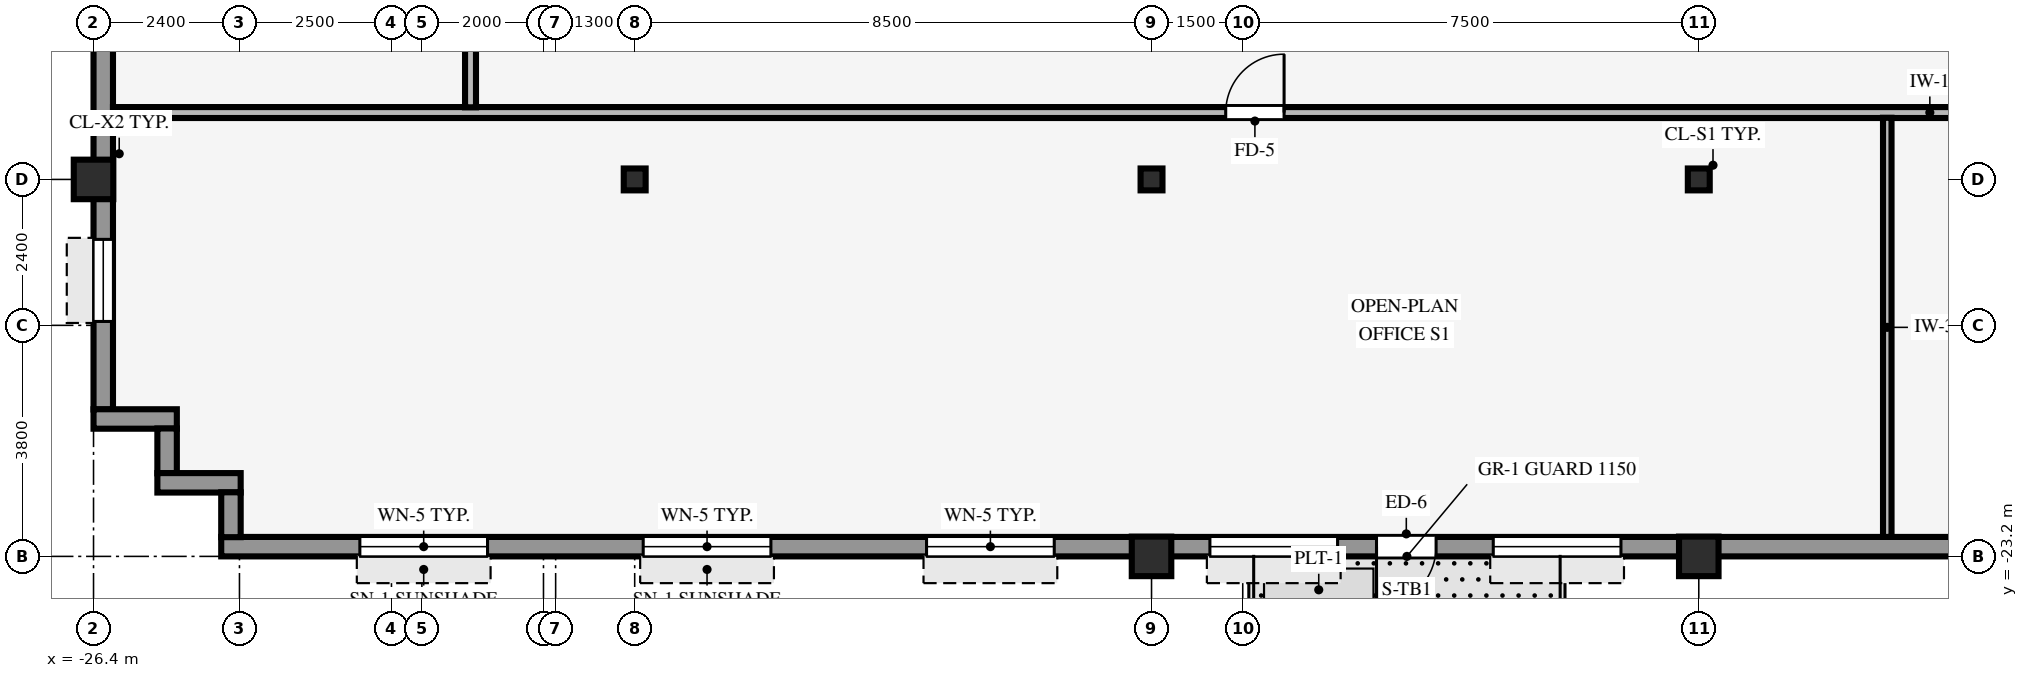
"""IFC4 building model, lengths in metres.
Left out: names, types, materials, properties, quantities, classifications, styles, units other than length and angle.
Written with IfcOpenShell. Run it as: python <this file> out.ifc"""

import sys

from ifc_helpers import new_model, si_unit, direction, frame, frame_2d, origin, origin_2d, place, context, subcontext, project, spatial, rectangle, hollow_rectangle, i_section, extrude, source, transform, mapped, element, fill, save


model = new_model("IFC4")
c1 = context("Model", 3, precision=1e-05, world=origin(), true_north=direction((0.0, 1.0)))
c2 = subcontext(c1, "Body", "Model", "MODEL_VIEW")
j1 = project(units=[si_unit("LENGTHUNIT", "METRE"), si_unit("PLANEANGLEUNIT", "RADIAN")], contexts=[c1])
p1 = place(None, origin())
s1 = spatial("IfcSite", under=j1, at=p1, CompositionType="ELEMENT")
p2 = place(p1, origin())
s2 = spatial("IfcBuilding", under=s1, at=p2, CompositionType="ELEMENT")
p3 = place(p2, frame((0.0, 0.0, 142.1)))
s3 = spatial("IfcBuildingStorey", under=s2, at=p3, CompositionType="ELEMENT", Elevation=142.1)
for number, where, z_axis, x_axis in (
    (1, (-26.4, -17.0, 0.0), (0.0, 0.0, 1.0), (1.0, 0.0, 0.0)),
    (2, (-9.0, -23.2, 0.0), (0.0, 0.0, 1.0), (1.0, 0.0, 0.0)),
    (3, (0.0, -23.2, 0.0), (0.0, 0.0, 1.0), (1.0, 0.0, 0.0)),
):
    element("IfcColumn", number, at=place(p3, frame(where, z_axis=z_axis, x_axis=x_axis)), inside=s3, PredefinedType="COLUMN", context=c2, shape_type="SweptSolid", body=[
        extrude(hollow_rectangle(XDim=0.65, YDim=0.65, WallThickness=0.04, InnerFilletRadius=0.04, OuterFilletRadius=0.08, at=origin_2d()), origin(), (0.0, 0.0, 1.0), 3.37),
    ])
for number, where, z_axis, x_axis in (
    (4, (0.0, -17.0, 0.0), (0.0, 0.0, 1.0), (1.0, 0.0, 0.0)),
    (5, (-17.5, -17.0, 0.0), (0.0, 0.0, 1.0), (1.0, 0.0, 0.0)),
    (6, (-9.0, -17.0, 0.0), (0.0, 0.0, 1.0), (1.0, 0.0, 0.0)),
):
    element("IfcColumn", number, at=place(p3, frame(where, z_axis=z_axis, x_axis=x_axis)), inside=s3, PredefinedType="COLUMN", context=c2, shape_type="SweptSolid", body=[
        extrude(i_section(OverallWidth=0.36, OverallDepth=0.36, WebThickness=0.021, FlangeThickness=0.021, FilletRadius=0.018, at=origin_2d()), origin(), (0.0, 0.0, 1.0), 3.37),
    ])
p4 = place(p3, frame((-24.3, -23.04, 0.0), z_axis=(0.0, 0.0, 1.0), x_axis=(1.0, 0.0, 0.0)))
e7 = element("IfcWall", 7, at=p4, inside=s3, PredefinedType="STANDARD", context=c2, shape_type="SweptSolid", body=[
    extrude(rectangle(XDim=48.6, YDim=0.32, at=frame_2d((24.3, 0.0))), origin(), (0.0, 0.0, 1.0), 2.705),
])
p5 = place(p4, frame((19.98, 0.0, 0.0), z_axis=(0.0, 0.0, 1.0), x_axis=(-1.0, 0.0, 0.0)))
e8 = element("IfcOpeningElement", 8, at=p5, cuts=e7, PredefinedType="OPENING", context=c2, shape_type="SweptSolid", body=[
    extrude(rectangle(XDim=0.98, YDim=2.15, at=frame_2d((0.49, 1.075))), frame((0.0, 0.17, 0.0), z_axis=(0.0, -1.0, 0.0), x_axis=(1.0, 0.0, 0.0)), (0.0, 0.0, 1.0), 0.34),
])
p6 = place(p4, frame((2.28, 0.0, 0.8)))
e9 = element("IfcOpeningElement", 9, at=p6, cuts=e7, PredefinedType="OPENING", context=c2, shape_type="SweptSolid", body=[
    extrude(rectangle(XDim=2.1, YDim=1.56, at=frame_2d((1.05, 0.78))), frame((0.0, 0.17, 0.0), z_axis=(0.0, -1.0, 0.0), x_axis=(1.0, 0.0, 0.0)), (0.0, 0.0, 1.0), 0.34),
])
p7 = place(p4, frame((6.94, 0.0, 0.8)))
e10 = element("IfcOpeningElement", 10, at=p7, cuts=e7, PredefinedType="OPENING", context=c2, shape_type="SweptSolid", body=[
    extrude(rectangle(XDim=2.1, YDim=1.56, at=frame_2d((1.05, 0.78))), frame((0.0, 0.17, 0.0), z_axis=(0.0, -1.0, 0.0), x_axis=(1.0, 0.0, 0.0)), (0.0, 0.0, 1.0), 0.34),
])
p8 = place(p4, frame((11.6, 0.0, 0.8)))
e11 = element("IfcOpeningElement", 11, at=p8, cuts=e7, PredefinedType="OPENING", context=c2, shape_type="SweptSolid", body=[
    extrude(rectangle(XDim=2.1, YDim=1.56, at=frame_2d((1.05, 0.78))), frame((0.0, 0.17, 0.0), z_axis=(0.0, -1.0, 0.0), x_axis=(1.0, 0.0, 0.0)), (0.0, 0.0, 1.0), 0.34),
])
p9 = place(p4, frame((16.26, 0.0, 0.8)))
e12 = element("IfcOpeningElement", 12, at=p9, cuts=e7, PredefinedType="OPENING", context=c2, shape_type="SweptSolid", body=[
    extrude(rectangle(XDim=2.1, YDim=1.56, at=frame_2d((1.05, 0.78))), frame((0.0, 0.17, 0.0), z_axis=(0.0, -1.0, 0.0), x_axis=(1.0, 0.0, 0.0)), (0.0, 0.0, 1.0), 0.34),
])
p10 = place(p4, frame((20.92, 0.0, 0.8)))
e13 = element("IfcOpeningElement", 13, at=p10, cuts=e7, PredefinedType="OPENING", context=c2, shape_type="SweptSolid", body=[
    extrude(rectangle(XDim=2.1, YDim=1.56, at=frame_2d((1.05, 0.78))), frame((0.0, 0.17, 0.0), z_axis=(0.0, -1.0, 0.0), x_axis=(1.0, 0.0, 0.0)), (0.0, 0.0, 1.0), 0.34),
])
p11 = place(p4, frame((30.24, 0.0, 0.8)))
e14 = element("IfcOpeningElement", 14, at=p11, cuts=e7, PredefinedType="OPENING", context=c2, shape_type="SweptSolid", body=[
    extrude(rectangle(XDim=2.1, YDim=1.56, at=frame_2d((1.05, 0.78))), frame((0.0, 0.17, 0.0), z_axis=(0.0, -1.0, 0.0), x_axis=(1.0, 0.0, 0.0)), (0.0, 0.0, 1.0), 0.34),
])
p12 = place(p4, frame((34.9, 0.0, 0.8)))
e15 = element("IfcOpeningElement", 15, at=p12, cuts=e7, PredefinedType="OPENING", context=c2, shape_type="SweptSolid", body=[
    extrude(rectangle(XDim=2.1, YDim=1.56, at=frame_2d((1.05, 0.78))), frame((0.0, 0.17, 0.0), z_axis=(0.0, -1.0, 0.0), x_axis=(1.0, 0.0, 0.0)), (0.0, 0.0, 1.0), 0.34),
])
p13 = place(p4, frame((39.56, 0.0, 0.8)))
e16 = element("IfcOpeningElement", 16, at=p13, cuts=e7, PredefinedType="OPENING", context=c2, shape_type="SweptSolid", body=[
    extrude(rectangle(XDim=2.1, YDim=1.56, at=frame_2d((1.05, 0.78))), frame((0.0, 0.17, 0.0), z_axis=(0.0, -1.0, 0.0), x_axis=(1.0, 0.0, 0.0)), (0.0, 0.0, 1.0), 0.34),
])
p14 = place(p4, frame((44.22, 0.0, 0.8)))
e17 = element("IfcOpeningElement", 17, at=p14, cuts=e7, PredefinedType="OPENING", context=c2, shape_type="SweptSolid", body=[
    extrude(rectangle(XDim=2.1, YDim=1.56, at=frame_2d((1.05, 0.78))), frame((0.0, 0.17, 0.0), z_axis=(0.0, -1.0, 0.0), x_axis=(1.0, 0.0, 0.0)), (0.0, 0.0, 1.0), 0.34),
])
p15 = place(p3, frame((-26.24, -20.784, 0.0), z_axis=(0.0, 0.0, 1.0), x_axis=(0.0, 1.0, 0.0)))
e18 = element("IfcWall", 18, at=p15, inside=s3, PredefinedType="STANDARD", context=c2, shape_type="SweptSolid", body=[
    extrude(rectangle(XDim=41.568, YDim=0.32, at=frame_2d((20.784, 0.0))), origin(), (0.0, 0.0, 1.0), 2.705),
])
p16 = place(p15, frame((1.448, 0.0, 0.8)))
e19 = element("IfcOpeningElement", 19, at=p16, cuts=e18, PredefinedType="OPENING", context=c2, shape_type="SweptSolid", body=[
    extrude(rectangle(XDim=1.35, YDim=1.56, at=frame_2d((0.675, 0.78))), frame((0.0, 0.17, 0.0), z_axis=(0.0, -1.0, 0.0), x_axis=(1.0, 0.0, 0.0)), (0.0, 0.0, 1.0), 0.34),
])
p17 = place(p15, frame((7.744, 0.0, 0.8)))
e20 = element("IfcOpeningElement", 20, at=p17, cuts=e18, PredefinedType="OPENING", context=c2, shape_type="SweptSolid", body=[
    extrude(rectangle(XDim=1.35, YDim=1.56, at=frame_2d((0.675, 0.78))), frame((0.0, 0.17, 0.0), z_axis=(0.0, -1.0, 0.0), x_axis=(1.0, 0.0, 0.0)), (0.0, 0.0, 1.0), 0.34),
])
p18 = place(p15, frame((12.69, 0.0, 0.8)))
e21 = element("IfcOpeningElement", 21, at=p18, cuts=e18, PredefinedType="OPENING", context=c2, shape_type="SweptSolid", body=[
    extrude(rectangle(XDim=1.35, YDim=1.56, at=frame_2d((0.675, 0.78))), frame((0.0, 0.17, 0.0), z_axis=(0.0, -1.0, 0.0), x_axis=(1.0, 0.0, 0.0)), (0.0, 0.0, 1.0), 0.34),
])
p19 = place(p15, frame((17.636, 0.0, 0.8)))
e22 = element("IfcOpeningElement", 22, at=p19, cuts=e18, PredefinedType="OPENING", context=c2, shape_type="SweptSolid", body=[
    extrude(rectangle(XDim=1.35, YDim=1.56, at=frame_2d((0.675, 0.78))), frame((0.0, 0.17, 0.0), z_axis=(0.0, -1.0, 0.0), x_axis=(1.0, 0.0, 0.0)), (0.0, 0.0, 1.0), 0.34),
])
p20 = place(p15, frame((22.582, 0.0, 0.8)))
e23 = element("IfcOpeningElement", 23, at=p20, cuts=e18, PredefinedType="OPENING", context=c2, shape_type="SweptSolid", body=[
    extrude(rectangle(XDim=1.35, YDim=1.56, at=frame_2d((0.675, 0.78))), frame((0.0, 0.17, 0.0), z_axis=(0.0, -1.0, 0.0), x_axis=(1.0, 0.0, 0.0)), (0.0, 0.0, 1.0), 0.34),
])
p21 = place(p15, frame((27.528, 0.0, 0.8)))
e24 = element("IfcOpeningElement", 24, at=p21, cuts=e18, PredefinedType="OPENING", context=c2, shape_type="SweptSolid", body=[
    extrude(rectangle(XDim=1.35, YDim=1.56, at=frame_2d((0.675, 0.78))), frame((0.0, 0.17, 0.0), z_axis=(0.0, -1.0, 0.0), x_axis=(1.0, 0.0, 0.0)), (0.0, 0.0, 1.0), 0.34),
])
p22 = place(p15, frame((32.474, 0.0, 0.8)))
e25 = element("IfcOpeningElement", 25, at=p22, cuts=e18, PredefinedType="OPENING", context=c2, shape_type="SweptSolid", body=[
    extrude(rectangle(XDim=1.35, YDim=1.56, at=frame_2d((0.675, 0.78))), frame((0.0, 0.17, 0.0), z_axis=(0.0, -1.0, 0.0), x_axis=(1.0, 0.0, 0.0)), (0.0, 0.0, 1.0), 0.34),
])
p23 = place(p15, frame((38.77, 0.0, 0.8)))
e26 = element("IfcOpeningElement", 26, at=p23, cuts=e18, PredefinedType="OPENING", context=c2, shape_type="SweptSolid", body=[
    extrude(rectangle(XDim=1.35, YDim=1.56, at=frame_2d((0.675, 0.78))), frame((0.0, 0.17, 0.0), z_axis=(0.0, -1.0, 0.0), x_axis=(1.0, 0.0, 0.0)), (0.0, 0.0, 1.0), 0.34),
])
p24 = place(p3, frame((-26.4, -20.94, 0.0), z_axis=(0.0, 0.0, 1.0), x_axis=(1.0, 0.0, 0.0)))
e27 = element("IfcWall", 27, at=p24, inside=s3, PredefinedType="STANDARD", context=c2, shape_type="SweptSolid", body=[
    extrude(rectangle(XDim=1.37, YDim=0.32, at=frame_2d((0.685, 0.0))), origin(), (0.0, 0.0, 1.0), 3.36),
])
p25 = place(p3, frame((-25.19, -21.834, 0.0), z_axis=(0.0, 0.0, 1.0), x_axis=(0.0, 1.0, 0.0)))
e28 = element("IfcWall", 28, at=p25, inside=s3, PredefinedType="STANDARD", context=c2, shape_type="SweptSolid", body=[
    extrude(rectangle(XDim=0.738, YDim=0.32, at=frame_2d((0.369, 0.0))), origin(), (0.0, 0.0, 1.0), 3.36),
])
p26 = place(p3, frame((-25.35, -21.99, 0.0), z_axis=(0.0, 0.0, 1.0), x_axis=(1.0, 0.0, 0.0)))
e29 = element("IfcWall", 29, at=p26, inside=s3, PredefinedType="STANDARD", context=c2, shape_type="SweptSolid", body=[
    extrude(rectangle(XDim=1.37, YDim=0.32, at=frame_2d((0.685, 0.0))), origin(), (0.0, 0.0, 1.0), 3.36),
])
p27 = place(p3, frame((-24.14, -22.884, 0.0), z_axis=(0.0, 0.0, 1.0), x_axis=(0.0, 1.0, 0.0)))
e30 = element("IfcWall", 30, at=p27, inside=s3, PredefinedType="STANDARD", context=c2, shape_type="SweptSolid", body=[
    extrude(rectangle(XDim=0.738, YDim=0.32, at=frame_2d((0.369, 0.0))), origin(), (0.0, 0.0, 1.0), 3.36),
])
p28 = place(p3, frame((-26.08, -15.9, 0.0), z_axis=(0.0, 0.0, 1.0), x_axis=(1.0, 0.0, 0.0)))
e31 = element("IfcWall", 31, at=p28, inside=s3, PredefinedType="PARTITIONING", context=c2, shape_type="SweptSolid", body=[
    extrude(rectangle(XDim=52.16, YDim=0.18, at=frame_2d((26.08, 0.0))), origin(), (0.0, 0.0, 1.0), 3.36),
])
p29 = place(p28, frame((18.3, 0.0, 0.0)))
e32 = element("IfcOpeningElement", 32, at=p29, cuts=e31, PredefinedType="OPENING", context=c2, shape_type="SweptSolid", body=[
    extrude(rectangle(XDim=0.96, YDim=2.1, at=frame_2d((0.48, 1.05))), frame((0.0, 0.1, 0.0), z_axis=(0.0, -1.0, 0.0), x_axis=(1.0, 0.0, 0.0)), (0.0, 0.0, 1.0), 0.2),
])
p30 = place(p28, frame((40.5, 0.0, 0.0)))
e33 = element("IfcOpeningElement", 33, at=p30, cuts=e31, PredefinedType="OPENING", context=c2, shape_type="SweptSolid", body=[
    extrude(rectangle(XDim=0.96, YDim=2.1, at=frame_2d((0.48, 1.05))), frame((0.0, 0.1, 0.0), z_axis=(0.0, -1.0, 0.0), x_axis=(1.0, 0.0, 0.0)), (0.0, 0.0, 1.0), 0.2),
])
p31 = place(p3, frame((-20.2, -15.814, 0.0), z_axis=(0.0, 0.0, 1.0), x_axis=(0.0, 1.0, 0.0)))
e34 = element("IfcWall", 34, at=p31, inside=s3, PredefinedType="PARTITIONING", context=c2, shape_type="SweptSolid", body=[
    extrude(rectangle(XDim=31.628, YDim=0.18, at=frame_2d((15.814, 0.0))), origin(), (0.0, 0.0, 1.0), 3.36),
])
p32 = place(p31, frame((10.684, 0.0, 0.0)))
e35 = element("IfcOpeningElement", 35, at=p32, cuts=e34, PredefinedType="OPENING", context=c2, shape_type="SweptSolid", body=[
    extrude(rectangle(XDim=0.96, YDim=2.1, at=frame_2d((0.48, 1.05))), frame((0.0, 0.1, 0.0), z_axis=(0.0, -1.0, 0.0), x_axis=(1.0, 0.0, 0.0)), (0.0, 0.0, 1.0), 0.2),
])
p33 = place(p31, frame((24.184, 0.0, 0.0)))
e36 = element("IfcOpeningElement", 36, at=p33, cuts=e34, PredefinedType="OPENING", context=c2, shape_type="SweptSolid", body=[
    extrude(rectangle(XDim=0.96, YDim=2.1, at=frame_2d((0.48, 1.05))), frame((0.0, 0.1, 0.0), z_axis=(0.0, -1.0, 0.0), x_axis=(1.0, 0.0, 0.0)), (0.0, 0.0, 1.0), 0.2),
])
p34 = place(p3, frame((3.1, -22.88, 0.0), z_axis=(0.0, 0.0, 1.0), x_axis=(0.0, 1.0, 0.0)))
e37 = element("IfcWall", 37, at=p34, inside=s3, PredefinedType="PARTITIONING", context=c2, shape_type="SweptSolid", body=[
    extrude(rectangle(XDim=6.894, YDim=0.14, at=frame_2d((3.447, 0.0))), origin(), (0.0, 0.0, 1.0), 3.36),
])
m1 = source(origin(), c2, "Body", "SweptSolid", [
    extrude(rectangle(XDim=0.98, YDim=2.15, at=frame_2d((0.49, 1.075))), frame((0.0, 0.025, 0.0), z_axis=(0.0, -1.0, 0.0), x_axis=(1.0, 0.0, 0.0)), (0.0, 0.0, 1.0), 0.05),
])
p35 = place(p5, origin())
e38 = element("IfcDoor", 38, at=p35, inside=s3, OperationType="SINGLE_SWING_RIGHT", PredefinedType="DOOR", context=c2, shape_type="MappedRepresentation", body=[
    mapped(m1, transform((0.0, 0.0, 0.0), scale=1.0)),
])
fill(e8, e38)
m2 = source(origin(), c2, "Body", "SweptSolid", [
    extrude(rectangle(XDim=2.1, YDim=1.56, at=frame_2d((1.05, 0.78))), frame((0.0, 0.03, 0.0), z_axis=(0.0, -1.0, 0.0), x_axis=(1.0, 0.0, 0.0)), (0.0, 0.0, 1.0), 0.06),
])
p36 = place(p6, origin())
e39 = element("IfcWindow", 39, at=p36, inside=s3, PartitioningType="SINGLE_PANEL", PredefinedType="WINDOW", context=c2, shape_type="MappedRepresentation", body=[
    mapped(m2, transform((0.0, 0.0, 0.0), scale=1.0)),
])
fill(e9, e39)
p37 = place(p7, origin())
e40 = element("IfcWindow", 40, at=p37, inside=s3, PartitioningType="SINGLE_PANEL", PredefinedType="WINDOW", context=c2, shape_type="MappedRepresentation", body=[
    mapped(m2, transform((0.0, 0.0, 0.0), scale=1.0)),
])
fill(e10, e40)
p38 = place(p8, origin())
e41 = element("IfcWindow", 41, at=p38, inside=s3, PartitioningType="SINGLE_PANEL", PredefinedType="WINDOW", context=c2, shape_type="MappedRepresentation", body=[
    mapped(m2, transform((0.0, 0.0, 0.0), scale=1.0)),
])
fill(e11, e41)
p39 = place(p9, origin())
e42 = element("IfcWindow", 42, at=p39, inside=s3, PartitioningType="SINGLE_PANEL", PredefinedType="WINDOW", context=c2, shape_type="MappedRepresentation", body=[
    mapped(m2, transform((0.0, 0.0, 0.0), scale=1.0)),
])
fill(e12, e42)
p40 = place(p10, origin())
e43 = element("IfcWindow", 43, at=p40, inside=s3, PartitioningType="SINGLE_PANEL", PredefinedType="WINDOW", context=c2, shape_type="MappedRepresentation", body=[
    mapped(m2, transform((0.0, 0.0, 0.0), scale=1.0)),
])
fill(e13, e43)
m3 = source(origin(), c2, "Body", "SweptSolid", [
    extrude(rectangle(XDim=1.35, YDim=1.56, at=frame_2d((0.675, 0.78))), frame((0.0, 0.03, 0.0), z_axis=(0.0, -1.0, 0.0), x_axis=(1.0, 0.0, 0.0)), (0.0, 0.0, 1.0), 0.06),
])
p41 = place(p16, origin())
e44 = element("IfcWindow", 44, at=p41, inside=s3, PartitioningType="SINGLE_PANEL", PredefinedType="WINDOW", context=c2, shape_type="MappedRepresentation", body=[
    mapped(m3, transform((0.0, 0.0, 0.0), scale=1.0)),
])
fill(e19, e44)
m4 = source(origin(), c2, "Body", "SweptSolid", [
    extrude(rectangle(XDim=0.96, YDim=2.1, at=frame_2d((0.48, 1.05))), frame((0.0, 0.025, 0.0), z_axis=(0.0, -1.0, 0.0), x_axis=(1.0, 0.0, 0.0)), (0.0, 0.0, 1.0), 0.05),
])
p42 = place(p29, origin())
e45 = element("IfcDoor", 45, at=p42, inside=s3, OperationType="SINGLE_SWING_RIGHT", PredefinedType="DOOR", context=c2, shape_type="MappedRepresentation", body=[
    mapped(m4, transform((0.0, 0.0, 0.0), scale=1.0)),
])
fill(e32, e45)
save(model, sys.argv[1])
